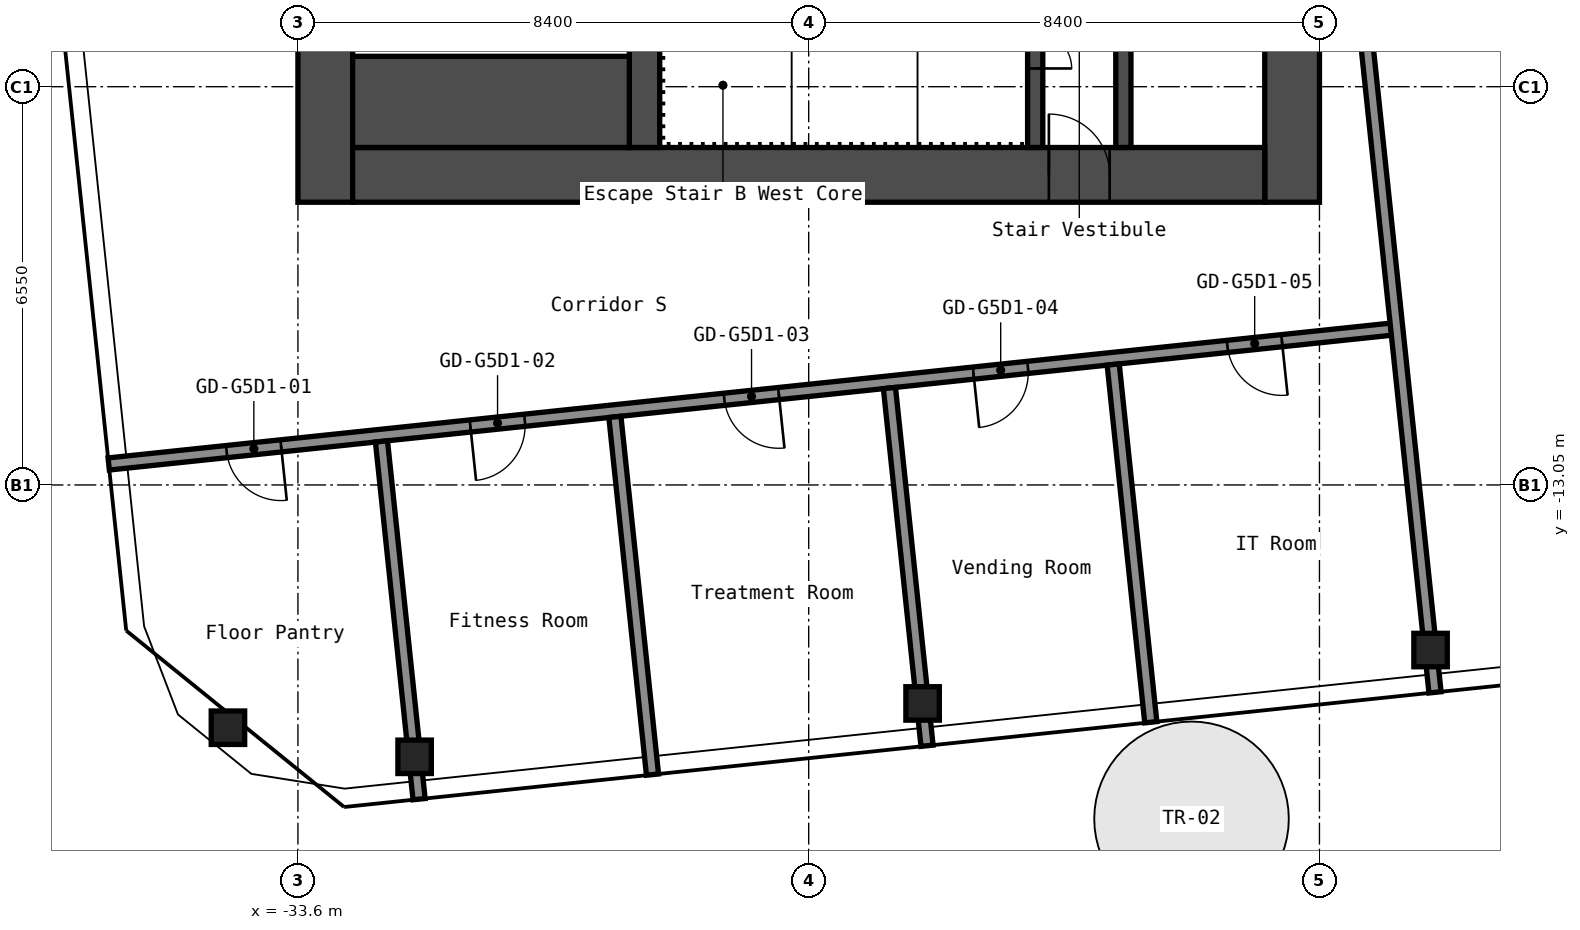
"""IFC4 building model, lengths in metres.
Left out: names, types, materials, properties, quantities, classifications, styles, units other than length and angle.
Written with IfcOpenShell. Run it as: python <this file> out.ifc"""

import sys

from ifc_helpers import new_model, si_unit, direction, frame, frame_2d, origin, origin_2d, place, context, subcontext, project, spatial, rectangle, hollow_rectangle, extrude, element, fill, save


model = new_model("IFC4")
c1 = context("Model", 3, precision=1e-05, world=origin(), true_north=direction((0.0, 1.0)))
c2 = subcontext(c1, "Body", "Model", "MODEL_VIEW")
j1 = project(units=[si_unit("LENGTHUNIT", "METRE"), si_unit("PLANEANGLEUNIT", "RADIAN")], contexts=[c1])
p1 = place(None, origin())
s1 = spatial("IfcSite", under=j1, at=p1, CompositionType="ELEMENT")
p2 = place(p1, origin())
s2 = spatial("IfcBuilding", under=s1, at=p2, CompositionType="ELEMENT")
p3 = place(p2, frame((0.0, 0.0, 261.4)))
s3 = spatial("IfcBuildingStorey", under=s2, at=p3, CompositionType="ELEMENT", Elevation=261.4)
for number, where, z_axis, x_axis in (
    (1, (-34.751, -17.042, 0.0), (0.0, 0.0, 1.0), (1.0, 0.0, 0.0)),
    (2, (-31.681, -17.521, 0.0), (0.0, 0.0, 1.0), (1.0, 0.0, 0.0)),
    (3, (-23.327, -16.643, 0.0), (0.0, 0.0, 1.0), (1.0, 0.0, 0.0)),
    (4, (-14.973, -15.765, 0.0), (0.0, 0.0, 1.0), (1.0, 0.0, 0.0)),
):
    element("IfcColumn", number, at=place(p3, frame(where, z_axis=z_axis, x_axis=x_axis)), inside=s3, PredefinedType="COLUMN", context=c2, shape_type="SweptSolid", body=[
        extrude(hollow_rectangle(XDim=0.55, YDim=0.55, WallThickness=0.022, InnerFilletRadius=0.033, OuterFilletRadius=0.055, at=origin_2d()), origin(), (0.0, 0.0, 1.0), 2.75),
    ])
p4 = place(p3, frame((-17.25, -8.4, 0.0), z_axis=(0.0, 0.0, 1.0), x_axis=(0.0, 1.0, 0.0)))
e5 = element("IfcWall", 5, at=p4, inside=s3, PredefinedType="SHEAR", context=c2, shape_type="SweptSolid", body=[
    extrude(rectangle(XDim=16.8, YDim=0.9, at=frame_2d((8.4, 0.0))), origin(), (0.0, 0.0, 1.0), 2.75),
])
p5 = place(p4, frame((8.321, 0.0, 0.0)))
e6 = element("IfcOpeningElement", 6, at=p5, cuts=e5, PredefinedType="OPENING", context=c2, shape_type="SweptSolid", body=[
    extrude(rectangle(XDim=1.6, YDim=2.1, at=frame_2d((0.8, 1.05))), frame((0.0, 0.46, 0.0), z_axis=(0.0, -1.0, 0.0), x_axis=(1.0, 0.0, 0.0)), (0.0, 0.0, 1.0), 0.92),
])
p6 = place(p3, frame((-33.15, -8.4, 0.0), z_axis=(0.0, 0.0, 1.0), x_axis=(0.0, 1.0, 0.0)))
e7 = element("IfcWall", 7, at=p6, inside=s3, PredefinedType="SHEAR", context=c2, shape_type="SweptSolid", body=[
    extrude(rectangle(XDim=16.8, YDim=0.9, at=frame_2d((8.4, 0.0))), origin(), (0.0, 0.0, 1.0), 2.75),
])
p7 = place(p3, frame((-32.7, -7.95, 0.0), z_axis=(0.0, 0.0, 1.0), x_axis=(1.0, 0.0, 0.0)))
e8 = element("IfcWall", 8, at=p7, inside=s3, PredefinedType="SHEAR", context=c2, shape_type="SweptSolid", body=[
    extrude(rectangle(XDim=15.0, YDim=0.9, at=frame_2d((7.5, 0.0))), origin(), (0.0, 0.0, 1.0), 2.75),
])
p8 = place(p7, frame((11.45, 0.0, 0.0)))
e9 = element("IfcOpeningElement", 9, at=p8, cuts=e8, PredefinedType="OPENING", context=c2, shape_type="SweptSolid", body=[
    extrude(rectangle(XDim=1.0, YDim=2.1, at=frame_2d((0.5, 1.05))), frame((0.0, 0.46, 0.0), z_axis=(0.0, -1.0, 0.0), x_axis=(1.0, 0.0, 0.0)), (0.0, 0.0, 1.0), 0.92),
])
p9 = place(p3, frame((-20.025, -7.5, 0.0), z_axis=(0.0, 0.0, 1.0), x_axis=(0.0, 1.0, 0.0)))
e10 = element("IfcWall", 10, at=p9, inside=s3, PredefinedType="SHEAR", context=c2, shape_type="SweptSolid", body=[
    extrude(rectangle(XDim=6.3, YDim=0.25, at=frame_2d((3.15, 0.0))), origin(), (0.0, 0.0, 1.0), 2.75),
])
p10 = place(p9, frame((2.4, 0.0, 0.0)))
e11 = element("IfcOpeningElement", 11, at=p10, cuts=e10, PredefinedType="OPENING", context=c2, shape_type="SweptSolid", body=[
    extrude(rectangle(XDim=1.0, YDim=2.1, at=frame_2d((0.5, 1.05))), frame((0.0, 0.135, 0.0), z_axis=(0.0, -1.0, 0.0), x_axis=(1.0, 0.0, 0.0)), (0.0, 0.0, 1.0), 0.27),
])
p11 = place(p3, frame((-21.475, -7.5, 0.0), z_axis=(0.0, 0.0, 1.0), x_axis=(0.0, 1.0, 0.0)))
e12 = element("IfcWall", 12, at=p11, inside=s3, PredefinedType="SHEAR", context=c2, shape_type="SweptSolid", body=[
    extrude(rectangle(XDim=3.75, YDim=0.25, at=frame_2d((1.875, 0.0))), origin(), (0.0, 0.0, 1.0), 2.75),
])
p12 = place(p11, frame((1.3, 0.0, 0.0)))
e13 = element("IfcOpeningElement", 13, at=p12, cuts=e12, PredefinedType="OPENING", context=c2, shape_type="SweptSolid", body=[
    extrude(rectangle(XDim=1.2, YDim=2.1, at=frame_2d((0.6, 1.05))), frame((0.0, 0.135, 0.0), z_axis=(0.0, -1.0, 0.0), x_axis=(1.0, 0.0, 0.0)), (0.0, 0.0, 1.0), 0.27),
])
p13 = place(p3, frame((-27.9, -7.5, 0.0), z_axis=(0.0, 0.0, 1.0), x_axis=(0.0, 1.0, 0.0)))
e14 = element("IfcWall", 14, at=p13, inside=s3, PredefinedType="SHEAR", context=c2, shape_type="SweptSolid", body=[
    extrude(rectangle(XDim=3.75, YDim=0.5, at=frame_2d((1.875, 0.0))), origin(), (0.0, 0.0, 1.0), 2.75),
])
p14 = place(p3, frame((-32.7, -6.75, 0.0), z_axis=(0.0, 0.0, 1.0), x_axis=(1.0, 0.0, 0.0)))
e15 = element("IfcWall", 15, at=p14, inside=s3, PredefinedType="SHEAR", context=c2, shape_type="SweptSolid", body=[
    extrude(rectangle(XDim=4.55, YDim=1.5, at=frame_2d((2.275, 0.0))), origin(), (0.0, 0.0, 1.0), 2.75),
])
p15 = place(p3, frame((-36.712, -12.705, 0.0), z_axis=(0.0, 0.0, 1.0), x_axis=(0.994522460242, 0.104523088709, 0.0)))
e16 = element("IfcWall", 16, at=p15, inside=s3, PredefinedType="PARTITIONING", context=c2, shape_type="SweptSolid", body=[
    extrude(rectangle(XDim=21.3, YDim=0.2, at=frame_2d((10.65, 0.0))), origin(), (0.0, 0.0, 1.0), 2.75),
])
p16 = place(p15, frame((1.95, 0.0, 0.0)))
e17 = element("IfcOpeningElement", 17, at=p16, cuts=e16, PredefinedType="OPENING", context=c2, shape_type="SweptSolid", body=[
    extrude(rectangle(XDim=0.9, YDim=2.1, at=frame_2d((0.45, 1.05))), frame((0.0, 0.11, 0.0), z_axis=(0.0, -1.0, 0.0), x_axis=(1.0, 0.0, 0.0)), (0.0, 0.0, 1.0), 0.22),
])
p17 = place(p15, frame((5.98, 0.0, 0.0)))
e18 = element("IfcOpeningElement", 18, at=p17, cuts=e16, PredefinedType="OPENING", context=c2, shape_type="SweptSolid", body=[
    extrude(rectangle(XDim=0.9, YDim=2.1, at=frame_2d((0.45, 1.05))), frame((0.0, 0.11, 0.0), z_axis=(0.0, -1.0, 0.0), x_axis=(1.0, 0.0, 0.0)), (0.0, 0.0, 1.0), 0.22),
])
p18 = place(p15, frame((10.18, 0.0, 0.0)))
e19 = element("IfcOpeningElement", 19, at=p18, cuts=e16, PredefinedType="OPENING", context=c2, shape_type="SweptSolid", body=[
    extrude(rectangle(XDim=0.9, YDim=2.1, at=frame_2d((0.45, 1.05))), frame((0.0, 0.11, 0.0), z_axis=(0.0, -1.0, 0.0), x_axis=(1.0, 0.0, 0.0)), (0.0, 0.0, 1.0), 0.22),
])
p19 = place(p15, frame((14.3, 0.0, 0.0)))
e20 = element("IfcOpeningElement", 20, at=p19, cuts=e16, PredefinedType="OPENING", context=c2, shape_type="SweptSolid", body=[
    extrude(rectangle(XDim=0.9, YDim=2.1, at=frame_2d((0.45, 1.05))), frame((0.0, 0.11, 0.0), z_axis=(0.0, -1.0, 0.0), x_axis=(1.0, 0.0, 0.0)), (0.0, 0.0, 1.0), 0.22),
])
p20 = place(p15, frame((18.5, 0.0, 0.0)))
e21 = element("IfcOpeningElement", 21, at=p20, cuts=e16, PredefinedType="OPENING", context=c2, shape_type="SweptSolid", body=[
    extrude(rectangle(XDim=0.9, YDim=2.1, at=frame_2d((0.45, 1.05))), frame((0.0, 0.11, 0.0), z_axis=(0.0, -1.0, 0.0), x_axis=(1.0, 0.0, 0.0)), (0.0, 0.0, 1.0), 0.22),
])
p21 = place(p3, frame((-31.608, -18.217, 0.0), z_axis=(0.0, 0.0, 1.0), x_axis=(-0.10453655107, 0.994521045273, 0.0)))
e22 = element("IfcWall", 22, at=p21, inside=s3, PredefinedType="PARTITIONING", context=c2, shape_type="SweptSolid", body=[
    extrude(rectangle(XDim=5.916, YDim=0.2, at=frame_2d((2.958, 0.0))), origin(), (0.0, 0.0, 1.0), 2.75),
])
p22 = place(p3, frame((-27.769, -17.814, 0.0), z_axis=(0.0, 0.0, 1.0), x_axis=(-0.104532260673, 0.994521496238, 0.0)))
e23 = element("IfcWall", 23, at=p22, inside=s3, PredefinedType="PARTITIONING", context=c2, shape_type="SweptSolid", body=[
    extrude(rectangle(XDim=5.916, YDim=0.2, at=frame_2d((2.958, 0.0))), origin(), (0.0, 0.0, 1.0), 2.75),
])
p23 = place(p3, frame((-23.254, -17.339, 0.0), z_axis=(0.0, 0.0, 1.0), x_axis=(-0.10453655107, 0.994521045273, 0.0)))
e24 = element("IfcWall", 24, at=p23, inside=s3, PredefinedType="PARTITIONING", context=c2, shape_type="SweptSolid", body=[
    extrude(rectangle(XDim=5.916, YDim=0.2, at=frame_2d((2.958, 0.0))), origin(), (0.0, 0.0, 1.0), 2.75),
])
p24 = place(p3, frame((-19.574, -16.953, 0.0), z_axis=(0.0, 0.0, 1.0), x_axis=(-0.104491443182, 0.994525785639, 0.0)))
e25 = element("IfcWall", 25, at=p24, inside=s3, PredefinedType="PARTITIONING", context=c2, shape_type="SweptSolid", body=[
    extrude(rectangle(XDim=5.916, YDim=0.2, at=frame_2d((2.958, 0.0))), origin(), (0.0, 0.0, 1.0), 2.75),
])
p25 = place(p3, frame((-14.9, -16.461, 0.0), z_axis=(0.0, 0.0, 1.0), x_axis=(-0.104523729364, 0.99452239291, 0.0)))
e26 = element("IfcWall", 26, at=p25, inside=s3, PredefinedType="PARTITIONING", context=c2, shape_type="SweptSolid", body=[
    extrude(rectangle(XDim=15.308, YDim=0.2, at=frame_2d((7.654, 0.0))), origin(), (0.0, 0.0, 1.0), 2.75),
])
p26 = place(p8, origin())
e27 = element("IfcDoor", 27, at=p26, inside=s3, OperationType="SINGLE_SWING_RIGHT", PredefinedType="DOOR", context=c2, shape_type="SweptSolid", body=[
    extrude(rectangle(XDim=1.0, YDim=2.1, at=frame_2d((0.5, 1.05))), frame((0.0, 0.025, 0.0), z_axis=(0.0, -1.0, 0.0), x_axis=(1.0, 0.0, 0.0)), (0.0, 0.0, 1.0), 0.05),
])
fill(e9, e27)
p27 = place(p12, origin())
e28 = element("IfcDoor", 28, at=p27, inside=s3, OperationType="DOUBLE_DOOR_SINGLE_SWING", PredefinedType="DOOR", context=c2, shape_type="SweptSolid", body=[
    extrude(rectangle(XDim=1.2, YDim=2.1, at=frame_2d((0.6, 1.05))), frame((0.0, 0.025, 0.0), z_axis=(0.0, -1.0, 0.0), x_axis=(1.0, 0.0, 0.0)), (0.0, 0.0, 1.0), 0.05),
])
fill(e13, e28)
p28 = place(p16, origin())
e29 = element("IfcDoor", 29, at=p28, inside=s3, OperationType="SINGLE_SWING_RIGHT", PredefinedType="DOOR", context=c2, shape_type="SweptSolid", body=[
    extrude(rectangle(XDim=0.9, YDim=2.1, at=frame_2d((0.45, 1.05))), frame((0.0, 0.025, 0.0), z_axis=(0.0, -1.0, 0.0), x_axis=(1.0, 0.0, 0.0)), (0.0, 0.0, 1.0), 0.05),
])
fill(e17, e29)
p29 = place(p17, origin())
e30 = element("IfcDoor", 30, at=p29, inside=s3, OperationType="SINGLE_SWING_LEFT", PredefinedType="DOOR", context=c2, shape_type="SweptSolid", body=[
    extrude(rectangle(XDim=0.9, YDim=2.1, at=frame_2d((0.45, 1.05))), frame((0.0, 0.025, 0.0), z_axis=(0.0, -1.0, 0.0), x_axis=(1.0, 0.0, 0.0)), (0.0, 0.0, 1.0), 0.05),
])
fill(e18, e30)
p30 = place(p18, origin())
e31 = element("IfcDoor", 31, at=p30, inside=s3, OperationType="SINGLE_SWING_RIGHT", PredefinedType="DOOR", context=c2, shape_type="SweptSolid", body=[
    extrude(rectangle(XDim=0.9, YDim=2.1, at=frame_2d((0.45, 1.05))), frame((0.0, 0.025, 0.0), z_axis=(0.0, -1.0, 0.0), x_axis=(1.0, 0.0, 0.0)), (0.0, 0.0, 1.0), 0.05),
])
fill(e19, e31)
p31 = place(p19, origin())
e32 = element("IfcDoor", 32, at=p31, inside=s3, OperationType="SINGLE_SWING_LEFT", PredefinedType="DOOR", context=c2, shape_type="SweptSolid", body=[
    extrude(rectangle(XDim=0.9, YDim=2.1, at=frame_2d((0.45, 1.05))), frame((0.0, 0.025, 0.0), z_axis=(0.0, -1.0, 0.0), x_axis=(1.0, 0.0, 0.0)), (0.0, 0.0, 1.0), 0.05),
])
fill(e20, e32)
p32 = place(p20, origin())
e33 = element("IfcDoor", 33, at=p32, inside=s3, OperationType="SINGLE_SWING_RIGHT", PredefinedType="DOOR", context=c2, shape_type="SweptSolid", body=[
    extrude(rectangle(XDim=0.9, YDim=2.1, at=frame_2d((0.45, 1.05))), frame((0.0, 0.025, 0.0), z_axis=(0.0, -1.0, 0.0), x_axis=(1.0, 0.0, 0.0)), (0.0, 0.0, 1.0), 0.05),
])
fill(e21, e33)
save(model, sys.argv[1])
